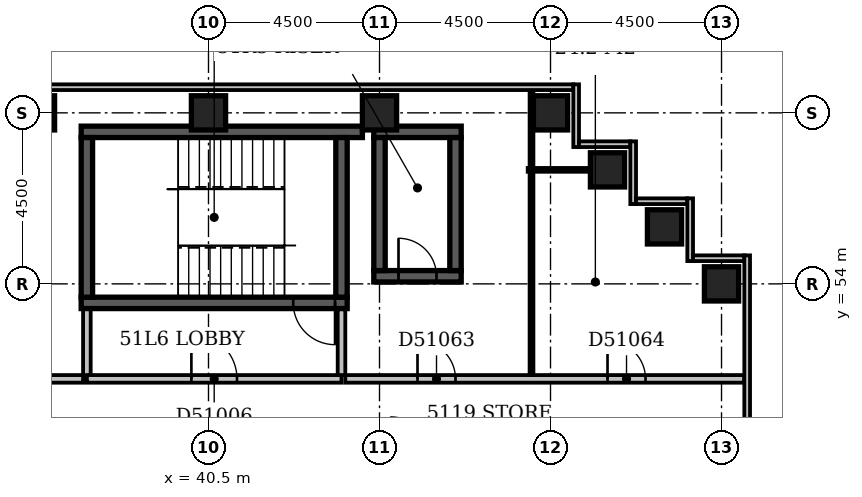
"""IFC4 building model, lengths in metres.
Left out: names, types, materials, properties, quantities, classifications, styles, units other than length and angle.
Written with IfcOpenShell. Run it as: python <this file> out.ifc"""

import sys

from ifc_helpers import new_model, si_unit, direction, frame, frame_2d, origin, origin_2d, place, context, subcontext, project, spatial, rectangle, extrude, element, fill, save


model = new_model("IFC4")
c1 = context("Model", 3, precision=1e-05, world=origin(), true_north=direction((0.0, 1.0)))
c2 = subcontext(c1, "Body", "Model", "MODEL_VIEW")
j1 = project(units=[si_unit("LENGTHUNIT", "METRE"), si_unit("PLANEANGLEUNIT", "RADIAN")], contexts=[c1])
p1 = place(None, origin())
s1 = spatial("IfcSite", under=j1, at=p1, CompositionType="ELEMENT")
p2 = place(p1, origin())
s2 = spatial("IfcBuilding", under=s1, at=p2, CompositionType="ELEMENT")
p3 = place(p2, frame((0.0, 0.0, 200.6)))
s3 = spatial("IfcBuildingStorey", under=s2, at=p3, CompositionType="ELEMENT", Elevation=200.6)
p4 = place(p3, frame((37.15, 53.5, -0.3), z_axis=(0.0, 0.0, 1.0), x_axis=(1.0, 0.0, 0.0)))
e1 = element("IfcWall", 1, at=p4, inside=s3, PredefinedType="SHEAR", context=c2, shape_type="SweptSolid", body=[
    extrude(rectangle(XDim=7.0, YDim=0.3, at=frame_2d((3.5, 0.0))), origin(), (0.0, 0.0, 1.0), 3.6),
])
p5 = place(p4, frame((5.58, 0.0, 0.3)))
e2 = element("IfcOpeningElement", 2, at=p5, cuts=e1, PredefinedType="OPENING", context=c2, shape_type="SweptSolid", body=[
    extrude(rectangle(XDim=1.1, YDim=2.1, at=frame_2d((0.55, 1.05))), frame((0.0, 0.162, 0.0), z_axis=(0.0, -1.0, 0.0), x_axis=(1.0, 0.0, 0.0)), (0.0, 0.0, 1.0), 0.324),
])
p6 = place(p3, frame((37.15, 58.0, -0.3), z_axis=(0.0, 0.0, 1.0), x_axis=(1.0, 0.0, 0.0)))
e3 = element("IfcWall", 3, at=p6, inside=s3, PredefinedType="SHEAR", context=c2, shape_type="SweptSolid", body=[
    extrude(rectangle(XDim=7.4, YDim=0.3, at=frame_2d((3.7, 0.0))), origin(), (0.0, 0.0, 1.0), 3.6),
])
for number, where, z_axis, x_axis in (
    (4, (37.3, 53.65, -0.3), (0.0, 0.0, 1.0), (0.0, 1.0, 0.0)),
    (5, (44.0, 53.65, -0.3), (0.0, 0.0, 1.0), (0.0, 1.0, 0.0)),
):
    element("IfcWall", number, at=place(p3, frame(where, z_axis=z_axis, x_axis=x_axis)), inside=s3, PredefinedType="SHEAR", context=c2, shape_type="SweptSolid", body=[
        extrude(rectangle(XDim=4.2, YDim=0.3, at=frame_2d((2.1, 0.0))), origin(), (0.0, 0.0, 1.0), 3.6),
    ])
p7 = place(p3, frame((44.85, 54.2, -0.3), z_axis=(0.0, 0.0, 1.0), x_axis=(1.0, 0.0, 0.0)))
e6 = element("IfcWall", 6, at=p7, inside=s3, PredefinedType="SHEAR", context=c2, shape_type="SweptSolid", body=[
    extrude(rectangle(XDim=2.3, YDim=0.3, at=frame_2d((1.15, 0.0))), origin(), (0.0, 0.0, 1.0), 3.6),
])
p8 = place(p7, frame((0.65, 0.0, 0.3)))
e7 = element("IfcOpeningElement", 7, at=p8, cuts=e6, PredefinedType="OPENING", context=c2, shape_type="SweptSolid", body=[
    extrude(rectangle(XDim=1.0, YDim=2.1, at=frame_2d((0.5, 1.05))), frame((0.0, 0.162, 0.0), z_axis=(0.0, -1.0, 0.0), x_axis=(1.0, 0.0, 0.0)), (0.0, 0.0, 1.0), 0.324),
])
p9 = place(p3, frame((44.85, 58.0, -0.3), z_axis=(0.0, 0.0, 1.0), x_axis=(1.0, 0.0, 0.0)))
e8 = element("IfcWall", 8, at=p9, inside=s3, PredefinedType="SHEAR", context=c2, shape_type="SweptSolid", body=[
    extrude(rectangle(XDim=2.3, YDim=0.3, at=frame_2d((1.15, 0.0))), origin(), (0.0, 0.0, 1.0), 3.6),
])
for number, where, z_axis, x_axis in (
    (9, (45.0, 54.35, -0.3), (0.0, 0.0, 1.0), (0.0, 1.0, 0.0)),
    (10, (47.0, 54.35, -0.3), (0.0, 0.0, 1.0), (0.0, 1.0, 0.0)),
):
    element("IfcWall", number, at=place(p3, frame(where, z_axis=z_axis, x_axis=x_axis)), inside=s3, PredefinedType="SHEAR", context=c2, shape_type="SweptSolid", body=[
        extrude(rectangle(XDim=3.5, YDim=0.3, at=frame_2d((1.75, 0.0))), origin(), (0.0, 0.0, 1.0), 3.6),
    ])
for number, where, z_axis, x_axis in (
    (11, (54.0, 54.0, -0.3), (0.0, 0.0, 1.0), (1.0, 0.0, 0.0)),
    (12, (52.5, 55.5, -0.3), (0.0, 0.0, 1.0), (1.0, 0.0, 0.0)),
    (13, (51.0, 57.0, -0.3), (0.0, 0.0, 1.0), (1.0, 0.0, 0.0)),
    (14, (36.0, 58.5, -0.3), (0.0, 0.0, 1.0), (1.0, 0.0, 0.0)),
    (15, (40.5, 58.5, -0.3), (0.0, 0.0, 1.0), (1.0, 0.0, 0.0)),
    (16, (45.0, 58.5, -0.3), (0.0, 0.0, 1.0), (1.0, 0.0, 0.0)),
    (17, (49.5, 58.5, -0.3), (0.0, 0.0, 1.0), (1.0, 0.0, 0.0)),
):
    element("IfcColumn", number, at=place(p3, frame(where, z_axis=z_axis, x_axis=x_axis)), inside=s3, PredefinedType="COLUMN", context=c2, shape_type="SweptSolid", body=[
        extrude(rectangle(XDim=0.9, YDim=0.9, at=origin_2d()), origin(), (0.0, 0.0, 1.0), 3.6),
    ])
p10 = place(p3, frame((54.675, 39.9, 0.0), z_axis=(0.0, 0.0, 1.0), x_axis=(0.0, 1.0, 0.0)))
e18 = element("IfcWall", 18, at=p10, inside=s3, PredefinedType="STANDARD", context=c2, shape_type="SweptSolid", body=[
    extrude(rectangle(XDim=14.85, YDim=0.15, at=frame_2d((7.425, 0.0))), origin(), (0.0, 0.0, 1.0), 2.7),
])
p11 = place(p10, frame((5.939, 0.0, 0.6)))
e19 = element("IfcOpeningElement", 19, at=p11, cuts=e18, PredefinedType="OPENING", context=c2, shape_type="SweptSolid", body=[
    extrude(rectangle(XDim=2.4, YDim=1.8, at=frame_2d((1.2, 0.9))), frame((0.0, 0.087, 0.0), z_axis=(0.0, -1.0, 0.0), x_axis=(1.0, 0.0, 0.0)), (0.0, 0.0, 1.0), 0.174),
])
p12 = place(p3, frame((54.6, 54.675, 0.0), z_axis=(0.0, 0.0, 1.0), x_axis=(-1.0, 0.0, 0.0)))
e20 = element("IfcWall", 20, at=p12, inside=s3, PredefinedType="STANDARD", context=c2, shape_type="SweptSolid", body=[
    extrude(rectangle(XDim=1.35, YDim=0.15, at=frame_2d((0.675, 0.0))), origin(), (0.0, 0.0, 1.0), 2.7),
])
p13 = place(p3, frame((53.175, 54.6, 0.0), z_axis=(0.0, 0.0, 1.0), x_axis=(0.0, 1.0, 0.0)))
e21 = element("IfcWall", 21, at=p13, inside=s3, PredefinedType="STANDARD", context=c2, shape_type="SweptSolid", body=[
    extrude(rectangle(XDim=1.65, YDim=0.15, at=frame_2d((0.825, 0.0))), origin(), (0.0, 0.0, 1.0), 2.7),
])
p14 = place(p3, frame((53.1, 56.175, 0.0), z_axis=(0.0, 0.0, 1.0), x_axis=(-1.0, 0.0, 0.0)))
e22 = element("IfcWall", 22, at=p14, inside=s3, PredefinedType="STANDARD", context=c2, shape_type="SweptSolid", body=[
    extrude(rectangle(XDim=1.35, YDim=0.15, at=frame_2d((0.675, 0.0))), origin(), (0.0, 0.0, 1.0), 2.7),
])
p15 = place(p3, frame((51.675, 56.1, 0.0), z_axis=(0.0, 0.0, 1.0), x_axis=(0.0, 1.0, 0.0)))
e23 = element("IfcWall", 23, at=p15, inside=s3, PredefinedType="STANDARD", context=c2, shape_type="SweptSolid", body=[
    extrude(rectangle(XDim=1.65, YDim=0.15, at=frame_2d((0.825, 0.0))), origin(), (0.0, 0.0, 1.0), 2.7),
])
p16 = place(p3, frame((51.6, 57.675, 0.0), z_axis=(0.0, 0.0, 1.0), x_axis=(-1.0, 0.0, 0.0)))
e24 = element("IfcWall", 24, at=p16, inside=s3, PredefinedType="STANDARD", context=c2, shape_type="SweptSolid", body=[
    extrude(rectangle(XDim=1.35, YDim=0.15, at=frame_2d((0.675, 0.0))), origin(), (0.0, 0.0, 1.0), 2.7),
])
p17 = place(p3, frame((50.175, 57.6, 0.0), z_axis=(0.0, 0.0, 1.0), x_axis=(0.0, 1.0, 0.0)))
e25 = element("IfcWall", 25, at=p17, inside=s3, PredefinedType="STANDARD", context=c2, shape_type="SweptSolid", body=[
    extrude(rectangle(XDim=1.65, YDim=0.15, at=frame_2d((0.825, 0.0))), origin(), (0.0, 0.0, 1.0), 2.7),
])
p18 = place(p3, frame((50.1, 59.175, 0.0), z_axis=(0.0, 0.0, 1.0), x_axis=(-1.0, 0.0, 0.0)))
e26 = element("IfcWall", 26, at=p18, inside=s3, PredefinedType="STANDARD", context=c2, shape_type="SweptSolid", body=[
    extrude(rectangle(XDim=50.85, YDim=0.15, at=frame_2d((25.425, 0.0))), origin(), (0.0, 0.0, 1.0), 2.7),
])
p19 = place(p3, frame((37.3, 51.5, 0.0), z_axis=(0.0, 0.0, 1.0), x_axis=(1.0, 0.0, 0.0)))
e27 = element("IfcWall", 27, at=p19, inside=s3, PredefinedType="PARTITIONING", context=c2, shape_type="SweptSolid", body=[
    extrude(rectangle(XDim=6.7, YDim=0.2, at=frame_2d((3.35, 0.0))), origin(), (0.0, 0.0, 1.0), 3.3),
])
p20 = place(p19, frame((2.75, 0.0, 0.0)))
e28 = element("IfcOpeningElement", 28, at=p20, cuts=e27, PredefinedType="OPENING", context=c2, shape_type="SweptSolid", body=[
    extrude(rectangle(XDim=1.2, YDim=2.1, at=frame_2d((0.6, 1.05))), frame((0.0, 0.112, 0.0), z_axis=(0.0, -1.0, 0.0), x_axis=(1.0, 0.0, 0.0)), (0.0, 0.0, 1.0), 0.224),
])
for number, where, z_axis, x_axis in (
    (29, (44.0, 51.6, 0.0), (0.0, 0.0, 1.0), (0.0, 1.0, 0.0)),
    (30, (37.3, 51.6, 0.0), (0.0, 0.0, 1.0), (0.0, 1.0, 0.0)),
):
    element("IfcWall", number, at=place(p3, frame(where, z_axis=z_axis, x_axis=x_axis)), inside=s3, PredefinedType="PARTITIONING", context=c2, shape_type="SweptSolid", body=[
        extrude(rectangle(XDim=1.73, YDim=0.2, at=frame_2d((0.865, 0.0))), origin(), (0.0, 0.0, 1.0), 3.3),
    ])
p21 = place(p3, frame((27.9, 51.5, 0.0), z_axis=(0.0, 0.0, 1.0), x_axis=(1.0, 0.0, 0.0)))
e31 = element("IfcWall", 31, at=p21, inside=s3, PredefinedType="PARTITIONING", context=c2, shape_type="SweptSolid", body=[
    extrude(rectangle(XDim=9.3, YDim=0.2, at=frame_2d((4.65, 0.0))), origin(), (0.0, 0.0, 1.0), 3.3),
])
p22 = place(p21, frame((1.5, 0.0, 0.0)))
e32 = element("IfcOpeningElement", 32, at=p22, cuts=e31, PredefinedType="OPENING", context=c2, shape_type="SweptSolid", body=[
    extrude(rectangle(XDim=1.0, YDim=2.1, at=frame_2d((0.5, 1.05))), frame((0.0, 0.112, 0.0), z_axis=(0.0, -1.0, 0.0), x_axis=(1.0, 0.0, 0.0)), (0.0, 0.0, 1.0), 0.224),
])
p23 = place(p21, frame((6.3, 0.0, 0.0)))
e33 = element("IfcOpeningElement", 33, at=p23, cuts=e31, PredefinedType="OPENING", context=c2, shape_type="SweptSolid", body=[
    extrude(rectangle(XDim=0.9, YDim=2.1, at=frame_2d((0.45, 1.05))), frame((0.0, 0.112, 0.0), z_axis=(0.0, -1.0, 0.0), x_axis=(1.0, 0.0, 0.0)), (0.0, 0.0, 1.0), 0.224),
])
p24 = place(p3, frame((44.1, 51.5, 0.0), z_axis=(0.0, 0.0, 1.0), x_axis=(1.0, 0.0, 0.0)))
e34 = element("IfcWall", 34, at=p24, inside=s3, PredefinedType="PARTITIONING", context=c2, shape_type="SweptSolid", body=[
    extrude(rectangle(XDim=10.5, YDim=0.2, at=frame_2d((5.25, 0.0))), origin(), (0.0, 0.0, 1.0), 3.3),
])
p25 = place(p24, frame((1.9, 0.0, 0.0)))
e35 = element("IfcOpeningElement", 35, at=p25, cuts=e34, PredefinedType="OPENING", context=c2, shape_type="SweptSolid", body=[
    extrude(rectangle(XDim=1.0, YDim=2.1, at=frame_2d((0.5, 1.05))), frame((0.0, 0.112, 0.0), z_axis=(0.0, -1.0, 0.0), x_axis=(1.0, 0.0, 0.0)), (0.0, 0.0, 1.0), 0.224),
])
p26 = place(p24, frame((6.9, 0.0, 0.0)))
e36 = element("IfcOpeningElement", 36, at=p26, cuts=e34, PredefinedType="OPENING", context=c2, shape_type="SweptSolid", body=[
    extrude(rectangle(XDim=1.0, YDim=2.1, at=frame_2d((0.5, 1.05))), frame((0.0, 0.112, 0.0), z_axis=(0.0, -1.0, 0.0), x_axis=(1.0, 0.0, 0.0)), (0.0, 0.0, 1.0), 0.224),
])
p27 = place(p3, frame((49.0, 51.6, 0.0), z_axis=(0.0, 0.0, 1.0), x_axis=(0.0, 1.0, 0.0)))
e37 = element("IfcWall", 37, at=p27, inside=s3, PredefinedType="PARTITIONING", context=c2, shape_type="SweptSolid", body=[
    extrude(rectangle(XDim=7.5, YDim=0.1, at=frame_2d((3.75, 0.0))), origin(), (0.0, 0.0, 1.0), 3.3),
])
p28 = place(p3, frame((48.9, 57.0, 0.0), z_axis=(0.0, 0.0, 1.0), x_axis=(1.0, 0.0, 0.0)))
e38 = element("IfcWall", 38, at=p28, inside=s3, PredefinedType="PARTITIONING", context=c2, shape_type="SweptSolid", body=[
    extrude(rectangle(XDim=1.65, YDim=0.1, at=frame_2d((0.825, 0.0))), origin(), (0.0, 0.0, 1.0), 3.3),
])
p29 = place(p20, origin())
e39 = element("IfcDoor", 39, at=p29, inside=s3, OperationType="SINGLE_SWING_LEFT", PredefinedType="DOOR", context=c2, shape_type="SweptSolid", body=[
    extrude(rectangle(XDim=1.2, YDim=2.1, at=frame_2d((0.6, 1.05))), frame((0.0, 0.025, 0.0), z_axis=(0.0, -1.0, 0.0), x_axis=(1.0, 0.0, 0.0)), (0.0, 0.0, 1.0), 0.05),
])
fill(e28, e39)
p30 = place(p8, origin())
e40 = element("IfcDoor", 40, at=p30, inside=s3, OperationType="SINGLE_SWING_LEFT", PredefinedType="DOOR", context=c2, shape_type="SweptSolid", body=[
    extrude(rectangle(XDim=1.0, YDim=2.1, at=frame_2d((0.5, 1.05))), frame((0.0, 0.025, 0.0), z_axis=(0.0, -1.0, 0.0), x_axis=(1.0, 0.0, 0.0)), (0.0, 0.0, 1.0), 0.05),
])
fill(e7, e40)
p31 = place(p5, origin())
e41 = element("IfcDoor", 41, at=p31, inside=s3, OperationType="SINGLE_SWING_RIGHT", PredefinedType="DOOR", context=c2, shape_type="SweptSolid", body=[
    extrude(rectangle(XDim=1.1, YDim=2.1, at=frame_2d((0.55, 1.05))), frame((0.0, 0.025, 0.0), z_axis=(0.0, -1.0, 0.0), x_axis=(1.0, 0.0, 0.0)), (0.0, 0.0, 1.0), 0.05),
])
fill(e2, e41)
p32 = place(p25, origin())
e42 = element("IfcDoor", 42, at=p32, inside=s3, OperationType="SINGLE_SWING_LEFT", PredefinedType="DOOR", context=c2, shape_type="SweptSolid", body=[
    extrude(rectangle(XDim=1.0, YDim=2.1, at=frame_2d((0.5, 1.05))), frame((0.0, 0.025, 0.0), z_axis=(0.0, -1.0, 0.0), x_axis=(1.0, 0.0, 0.0)), (0.0, 0.0, 1.0), 0.05),
])
fill(e35, e42)
p33 = place(p26, origin())
e43 = element("IfcDoor", 43, at=p33, inside=s3, OperationType="SINGLE_SWING_LEFT", PredefinedType="DOOR", context=c2, shape_type="SweptSolid", body=[
    extrude(rectangle(XDim=1.0, YDim=2.1, at=frame_2d((0.5, 1.05))), frame((0.0, 0.025, 0.0), z_axis=(0.0, -1.0, 0.0), x_axis=(1.0, 0.0, 0.0)), (0.0, 0.0, 1.0), 0.05),
])
fill(e36, e43)
save(model, sys.argv[1])
